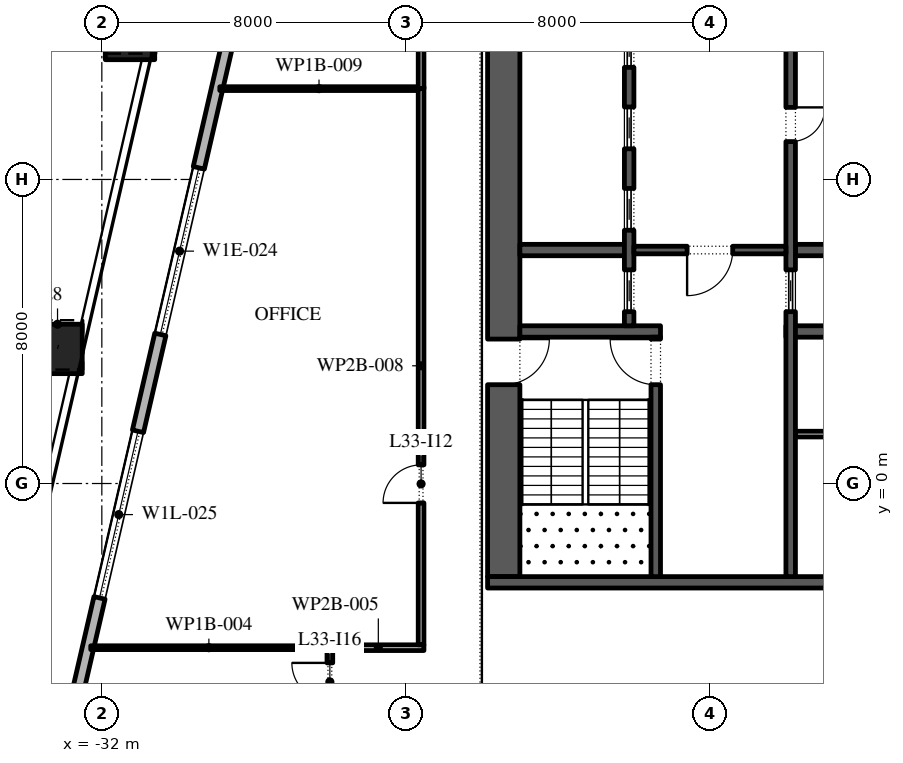
"""IFC4 building model, lengths in metres.
Left out: names, types, materials, properties, quantities, classifications, styles, units other than length and angle.
Written with IfcOpenShell. Run it as: python <this file> out.ifc"""

import sys

from ifc_helpers import new_model, si_unit, direction, frame, frame_2d, origin, origin_2d, place, context, subcontext, project, spatial, rectangle, extrude, element, fill, save


model = new_model("IFC4")
c1 = context("Model", 3, precision=1e-05, world=origin(), true_north=direction((0.0, 1.0)))
c2 = subcontext(c1, "Body", "Model", "MODEL_VIEW")
j1 = project(units=[si_unit("LENGTHUNIT", "METRE"), si_unit("PLANEANGLEUNIT", "RADIAN")], contexts=[c1])
p1 = place(None, origin())
s1 = spatial("IfcSite", under=j1, at=p1, CompositionType="ELEMENT")
p2 = place(p1, origin())
s2 = spatial("IfcBuilding", under=s1, at=p2, CompositionType="ELEMENT")
p3 = place(p2, frame((0.0, 0.0, 151.8)))
s3 = spatial("IfcBuildingStorey", under=s2, at=p3, CompositionType="ELEMENT", Elevation=151.8)
p4 = place(p3, frame((-31.259, 11.801, 0.0), z_axis=(0.008770884695, 0.037929719907, 0.99924191662), x_axis=(-0.974290512438, 0.225295355862, 0.0)))
e1 = element("IfcColumn", 1, at=p4, inside=s3, PredefinedType="COLUMN", context=c2, shape_type="SweptSolid", body=[
    extrude(rectangle(XDim=1.3, YDim=1.3, at=origin_2d()), origin(), (0.0, 0.0, 1.0), 4.203),
])
p5 = place(p3, frame((-33.166, 3.541, 0.0), z_axis=(0.005869091843, 0.025277771797, 0.999663237302), x_axis=(-0.974088391429, 0.226167649504, 0.0)))
e2 = element("IfcColumn", 2, at=p5, inside=s3, PredefinedType="COLUMN", context=c2, shape_type="SweptSolid", body=[
    extrude(rectangle(XDim=1.3, YDim=1.3, at=origin_2d()), origin(), (0.0, 0.0, 1.0), 4.201),
])
p6 = place(p3, frame((-22.82, 37.016, 0.0), z_axis=(0.0, 0.0, 1.0), x_axis=(-0.224953880882, -0.974369412223, 0.0)))
e3 = element("IfcWall", 3, at=p6, inside=s3, PredefinedType="STANDARD", context=c2, shape_type="SweptSolid", body=[
    extrude(rectangle(XDim=49.5, YDim=0.3, at=frame_2d((24.75, 0.0))), origin(), (0.0, 0.0, 1.0), 3.95),
])
p7 = place(p6, frame((1.157, 0.0, 0.45)))
e4 = element("IfcOpeningElement", 4, at=p7, cuts=e3, PredefinedType="OPENING", context=c2, shape_type="SweptSolid", body=[
    extrude(rectangle(XDim=4.5, YDim=3.05, at=frame_2d((2.25, 1.525))), frame((0.0, 0.16, 0.0), z_axis=(0.0, -1.0, 0.0), x_axis=(1.0, 0.0, 0.0)), (0.0, 0.0, 1.0), 0.32),
])
p8 = place(p6, frame((8.121, 0.0, 0.45)))
e5 = element("IfcOpeningElement", 5, at=p8, cuts=e3, PredefinedType="OPENING", context=c2, shape_type="SweptSolid", body=[
    extrude(rectangle(XDim=4.5, YDim=3.0, at=frame_2d((2.25, 1.5))), frame((0.0, 0.16, 0.0), z_axis=(0.0, -1.0, 0.0), x_axis=(1.0, 0.0, 0.0)), (0.0, 0.0, 1.0), 0.32),
])
p9 = place(p6, frame((15.236, 0.0, 0.45)))
e6 = element("IfcOpeningElement", 6, at=p9, cuts=e3, PredefinedType="OPENING", context=c2, shape_type="SweptSolid", body=[
    extrude(rectangle(XDim=4.5, YDim=3.0, at=frame_2d((2.25, 1.5))), frame((0.0, 0.16, 0.0), z_axis=(0.0, -1.0, 0.0), x_axis=(1.0, 0.0, 0.0)), (0.0, 0.0, 1.0), 0.32),
])
p10 = place(p6, frame((23.4, 0.0, 0.0)))
e7 = element("IfcOpeningElement", 7, at=p10, cuts=e3, PredefinedType="OPENING", context=c2, shape_type="SweptSolid", body=[
    extrude(rectangle(XDim=2.4, YDim=3.5, at=frame_2d((1.2, 1.75))), frame((0.0, 0.16, 0.0), z_axis=(0.0, -1.0, 0.0), x_axis=(1.0, 0.0, 0.0)), (0.0, 0.0, 1.0), 0.32),
])
p11 = place(p6, frame((29.464, 0.0, 0.45)))
e8 = element("IfcOpeningElement", 8, at=p11, cuts=e3, PredefinedType="OPENING", context=c2, shape_type="SweptSolid", body=[
    extrude(rectangle(XDim=4.5, YDim=2.825, at=frame_2d((2.25, 1.413))), frame((0.0, 0.16, 0.0), z_axis=(0.0, -1.0, 0.0), x_axis=(1.0, 0.0, 0.0)), (0.0, 0.0, 1.0), 0.32),
])
p12 = place(p6, frame((36.579, 0.0, 0.45)))
e9 = element("IfcOpeningElement", 9, at=p12, cuts=e3, PredefinedType="OPENING", context=c2, shape_type="SweptSolid", body=[
    extrude(rectangle(XDim=4.5, YDim=2.625, at=frame_2d((2.25, 1.312))), frame((0.0, 0.16, 0.0), z_axis=(0.0, -1.0, 0.0), x_axis=(1.0, 0.0, 0.0)), (0.0, 0.0, 1.0), 0.32),
])
p13 = place(p6, frame((43.693, 0.0, 0.45)))
e10 = element("IfcOpeningElement", 10, at=p13, cuts=e3, PredefinedType="OPENING", context=c2, shape_type="SweptSolid", body=[
    extrude(rectangle(XDim=4.5, YDim=3.05, at=frame_2d((2.25, 1.525))), frame((0.0, 0.16, 0.0), z_axis=(0.0, -1.0, 0.0), x_axis=(1.0, 0.0, 0.0)), (0.0, 0.0, 1.0), 0.32),
])
p14 = place(p3, frame((-21.425, -2.45, 0.0), z_axis=(0.0, 0.0, 1.0), x_axis=(0.0, 1.0, 0.0)))
e11 = element("IfcWall", 11, at=p14, inside=s3, PredefinedType="SHEAR", context=c2, shape_type="SweptSolid", body=[
    extrude(rectangle(XDim=27.9, YDim=0.85, at=frame_2d((13.95, 0.0))), origin(), (0.0, 0.0, 1.0), 3.95),
])
p15 = place(p14, frame((5.05, 0.0, 0.0)))
e12 = element("IfcOpeningElement", 12, at=p15, cuts=e11, PredefinedType="OPENING", context=c2, shape_type="SweptSolid", body=[
    extrude(rectangle(XDim=1.2, YDim=2.1, at=frame_2d((0.6, 1.05))), frame((0.0, 0.435, 0.0), z_axis=(0.0, -1.0, 0.0), x_axis=(1.0, 0.0, 0.0)), (0.0, 0.0, 1.0), 0.87),
])
p16 = place(p14, frame((21.65, 0.0, 0.0)))
e13 = element("IfcOpeningElement", 13, at=p16, cuts=e11, PredefinedType="OPENING", context=c2, shape_type="SweptSolid", body=[
    extrude(rectangle(XDim=1.2, YDim=2.1, at=frame_2d((0.6, 1.05))), frame((0.0, 0.435, 0.0), z_axis=(0.0, -1.0, 0.0), x_axis=(1.0, 0.0, 0.0)), (0.0, 0.0, 1.0), 0.87),
])
p17 = place(p3, frame((-21.85, -2.6, 0.0), z_axis=(0.0, 0.0, 1.0), x_axis=(1.0, 0.0, 0.0)))
e14 = element("IfcWall", 14, at=p17, inside=s3, PredefinedType="SHEAR", context=c2, shape_type="SweptSolid", body=[
    extrude(rectangle(XDim=11.7, YDim=0.3, at=frame_2d((5.85, 0.0))), origin(), (0.0, 0.0, 1.0), 3.95),
])
p18 = place(p3, frame((-21.0, 4.0, 0.0), z_axis=(0.0, 0.0, 1.0), x_axis=(1.0, 0.0, 0.0)))
e15 = element("IfcWall", 15, at=p18, inside=s3, PredefinedType="SHEAR", context=c2, shape_type="SweptSolid", body=[
    extrude(rectangle(XDim=3.7, YDim=0.3, at=frame_2d((1.85, 0.0))), origin(), (0.0, 0.0, 1.0), 3.95),
])
p19 = place(p3, frame((-17.425, -2.45, 0.0), z_axis=(0.0, 0.0, 1.0), x_axis=(0.0, 1.0, 0.0)))
e16 = element("IfcWall", 16, at=p19, inside=s3, PredefinedType="SHEAR", context=c2, shape_type="SweptSolid", body=[
    extrude(rectangle(XDim=6.3, YDim=0.25, at=frame_2d((3.15, 0.0))), origin(), (0.0, 0.0, 1.0), 3.95),
])
p20 = place(p19, frame((5.05, 0.0, 0.0)))
e17 = element("IfcOpeningElement", 17, at=p20, cuts=e16, PredefinedType="OPENING", context=c2, shape_type="SweptSolid", body=[
    extrude(rectangle(XDim=1.2, YDim=2.1, at=frame_2d((0.6, 1.05))), frame((0.0, 0.135, 0.0), z_axis=(0.0, -1.0, 0.0), x_axis=(1.0, 0.0, 0.0)), (0.0, 0.0, 1.0), 0.27),
])
p21 = place(p3, frame((-21.0, 6.143, 0.0), z_axis=(0.0, 0.0, 1.0), x_axis=(1.0, 0.0, 0.0)))
e18 = element("IfcWall", 18, at=p21, inside=s3, PredefinedType="SHEAR", context=c2, shape_type="SweptSolid", body=[
    extrude(rectangle(XDim=2.75, YDim=0.3, at=frame_2d((1.375, 0.0))), origin(), (0.0, 0.0, 1.0), 3.95),
])
p22 = place(p3, frame((-18.125, 4.15, 0.0), z_axis=(0.0, 0.0, 1.0), x_axis=(0.0, 1.0, 0.0)))
e19 = element("IfcWall", 19, at=p22, inside=s3, PredefinedType="SHEAR", context=c2, shape_type="SweptSolid", body=[
    extrude(rectangle(XDim=14.7, YDim=0.25, at=frame_2d((7.35, 0.0))), origin(), (0.0, 0.0, 1.0), 3.95),
])
p23 = place(p22, frame((0.371, 0.0, 0.0)))
e20 = element("IfcOpeningElement", 20, at=p23, cuts=e19, PredefinedType="OPENING", context=c2, shape_type="SweptSolid", body=[
    extrude(rectangle(XDim=1.1, YDim=2.1, at=frame_2d((0.55, 1.05))), frame((0.0, 0.135, 0.0), z_axis=(0.0, -1.0, 0.0), x_axis=(1.0, 0.0, 0.0)), (0.0, 0.0, 1.0), 0.27),
])
p24 = place(p22, frame((2.514, 0.0, 0.0)))
e21 = element("IfcOpeningElement", 21, at=p24, cuts=e19, PredefinedType="OPENING", context=c2, shape_type="SweptSolid", body=[
    extrude(rectangle(XDim=1.1, YDim=2.1, at=frame_2d((0.55, 1.05))), frame((0.0, 0.135, 0.0), z_axis=(0.0, -1.0, 0.0), x_axis=(1.0, 0.0, 0.0)), (0.0, 0.0, 1.0), 0.27),
])
p25 = place(p22, frame((4.657, 0.0, 0.0)))
e22 = element("IfcOpeningElement", 22, at=p25, cuts=e19, PredefinedType="OPENING", context=c2, shape_type="SweptSolid", body=[
    extrude(rectangle(XDim=1.1, YDim=2.1, at=frame_2d((0.55, 1.05))), frame((0.0, 0.135, 0.0), z_axis=(0.0, -1.0, 0.0), x_axis=(1.0, 0.0, 0.0)), (0.0, 0.0, 1.0), 0.27),
])
p26 = place(p22, frame((6.8, 0.0, 0.0)))
e23 = element("IfcOpeningElement", 23, at=p26, cuts=e19, PredefinedType="OPENING", context=c2, shape_type="SweptSolid", body=[
    extrude(rectangle(XDim=1.1, YDim=2.1, at=frame_2d((0.55, 1.05))), frame((0.0, 0.135, 0.0), z_axis=(0.0, -1.0, 0.0), x_axis=(1.0, 0.0, 0.0)), (0.0, 0.0, 1.0), 0.27),
])
p27 = place(p22, frame((8.943, 0.0, 0.0)))
e24 = element("IfcOpeningElement", 24, at=p27, cuts=e19, PredefinedType="OPENING", context=c2, shape_type="SweptSolid", body=[
    extrude(rectangle(XDim=1.1, YDim=2.1, at=frame_2d((0.55, 1.05))), frame((0.0, 0.135, 0.0), z_axis=(0.0, -1.0, 0.0), x_axis=(1.0, 0.0, 0.0)), (0.0, 0.0, 1.0), 0.27),
])
p28 = place(p22, frame((11.086, 0.0, 0.0)))
e25 = element("IfcOpeningElement", 25, at=p28, cuts=e19, PredefinedType="OPENING", context=c2, shape_type="SweptSolid", body=[
    extrude(rectangle(XDim=1.1, YDim=2.1, at=frame_2d((0.55, 1.05))), frame((0.0, 0.135, 0.0), z_axis=(0.0, -1.0, 0.0), x_axis=(1.0, 0.0, 0.0)), (0.0, 0.0, 1.0), 0.27),
])
p29 = place(p22, frame((13.229, 0.0, 0.0)))
e26 = element("IfcOpeningElement", 26, at=p29, cuts=e19, PredefinedType="OPENING", context=c2, shape_type="SweptSolid", body=[
    extrude(rectangle(XDim=1.1, YDim=2.1, at=frame_2d((0.55, 1.05))), frame((0.0, 0.135, 0.0), z_axis=(0.0, -1.0, 0.0), x_axis=(1.0, 0.0, 0.0)), (0.0, 0.0, 1.0), 0.27),
])
p30 = place(p3, frame((-14.0, 4.0, 0.0), z_axis=(0.0, 0.0, 1.0), x_axis=(1.0, 0.0, 0.0)))
e27 = element("IfcWall", 27, at=p30, inside=s3, PredefinedType="SHEAR", context=c2, shape_type="SweptSolid", body=[
    extrude(rectangle(XDim=3.0, YDim=0.3, at=frame_2d((1.5, 0.0))), origin(), (0.0, 0.0, 1.0), 3.95),
])
p31 = place(p3, frame((-13.75, 6.143, 0.0), z_axis=(0.0, 0.0, 1.0), x_axis=(1.0, 0.0, 0.0)))
e28 = element("IfcWall", 28, at=p31, inside=s3, PredefinedType="SHEAR", context=c2, shape_type="SweptSolid", body=[
    extrude(rectangle(XDim=2.75, YDim=0.3, at=frame_2d((1.375, 0.0))), origin(), (0.0, 0.0, 1.0), 3.95),
])
p32 = place(p3, frame((-13.875, -2.45, 0.0), z_axis=(0.0, 0.0, 1.0), x_axis=(0.0, 1.0, 0.0)))
e29 = element("IfcWall", 29, at=p32, inside=s3, PredefinedType="SHEAR", context=c2, shape_type="SweptSolid", body=[
    extrude(rectangle(XDim=21.3, YDim=0.25, at=frame_2d((10.65, 0.0))), origin(), (0.0, 0.0, 1.0), 3.95),
])
p33 = place(p32, frame((11.446, 0.0, 0.0)))
e30 = element("IfcOpeningElement", 30, at=p33, cuts=e29, PredefinedType="OPENING", context=c2, shape_type="SweptSolid", body=[
    extrude(rectangle(XDim=0.9, YDim=2.1, at=frame_2d((0.45, 1.05))), frame((0.0, 0.135, 0.0), z_axis=(0.0, -1.0, 0.0), x_axis=(1.0, 0.0, 0.0)), (0.0, 0.0, 1.0), 0.27),
])
p34 = place(p32, frame((17.725, 0.0, 0.0)))
e31 = element("IfcOpeningElement", 31, at=p34, cuts=e29, PredefinedType="OPENING", context=c2, shape_type="SweptSolid", body=[
    extrude(rectangle(XDim=0.9, YDim=2.1, at=frame_2d((0.45, 1.05))), frame((0.0, 0.135, 0.0), z_axis=(0.0, -1.0, 0.0), x_axis=(1.0, 0.0, 0.0)), (0.0, 0.0, 1.0), 0.27),
])
p35 = place(p32, frame((6.971, 0.0, 0.0)))
e32 = element("IfcOpeningElement", 32, at=p35, cuts=e29, PredefinedType="OPENING", context=c2, shape_type="SweptSolid", body=[
    extrude(rectangle(XDim=1.1, YDim=2.1, at=frame_2d((0.55, 1.05))), frame((0.0, 0.135, 0.0), z_axis=(0.0, -1.0, 0.0), x_axis=(1.0, 0.0, 0.0)), (0.0, 0.0, 1.0), 0.27),
])
p36 = place(p3, frame((-18.0, 6.143, 0.0), z_axis=(0.0, 0.0, 1.0), x_axis=(1.0, 0.0, 0.0)))
e33 = element("IfcWall", 33, at=p36, inside=s3, PredefinedType="SHEAR", context=c2, shape_type="SweptSolid", body=[
    extrude(rectangle(XDim=4.0, YDim=0.2, at=frame_2d((2.0, 0.0))), origin(), (0.0, 0.0, 1.0), 3.95),
])
p37 = place(p36, frame((1.4, 0.0, 0.0)))
e34 = element("IfcOpeningElement", 34, at=p37, cuts=e33, PredefinedType="OPENING", context=c2, shape_type="SweptSolid", body=[
    extrude(rectangle(XDim=1.2, YDim=2.1, at=frame_2d((0.6, 1.05))), frame((0.0, 0.11, 0.0), z_axis=(0.0, -1.0, 0.0), x_axis=(1.0, 0.0, 0.0)), (0.0, 0.0, 1.0), 0.22),
])
p38 = place(p3, frame((-13.75, 1.3, 0.0), z_axis=(0.0, 0.0, 1.0), x_axis=(1.0, 0.0, 0.0)))
e35 = element("IfcWall", 35, at=p38, inside=s3, PredefinedType="PARTITIONING", context=c2, shape_type="SweptSolid", body=[
    extrude(rectangle(XDim=2.75, YDim=0.15, at=frame_2d((1.375, 0.0))), origin(), (0.0, 0.0, 1.0), 3.95),
])
p39 = place(p3, frame((-26.0, -7.365, 0.0), z_axis=(0.0, 0.0, 1.0), x_axis=(0.0, 1.0, 0.0)))
e36 = element("IfcWall", 36, at=p39, inside=s3, PredefinedType="PARTITIONING", context=c2, shape_type="SweptSolid", body=[
    extrude(rectangle(XDim=3.095, YDim=0.15, at=frame_2d((1.547, 0.0))), origin(), (0.0, 0.0, 1.0), 3.114),
])
p40 = place(p39, frame((1.645, 0.0, 0.0)))
e37 = element("IfcOpeningElement", 37, at=p40, cuts=e36, PredefinedType="OPENING", context=c2, shape_type="SweptSolid", body=[
    extrude(rectangle(XDim=1.0, YDim=2.1, at=frame_2d((0.5, 1.05))), frame((0.0, 0.085, 0.0), z_axis=(0.0, -1.0, 0.0), x_axis=(1.0, 0.0, 0.0)), (0.0, 0.0, 1.0), 0.17),
])
p41 = place(p3, frame((-26.075, -4.32, 0.0), z_axis=(0.0, 0.0, 1.0), x_axis=(-1.0, 0.0, 0.0)))
e38 = element("IfcWall", 38, at=p41, inside=s3, PredefinedType="PARTITIONING", context=c2, shape_type="SweptSolid", body=[
    extrude(rectangle(XDim=6.217, YDim=0.1, at=frame_2d((3.108, 0.0))), origin(), (0.0, 0.0, 1.0), 3.95),
])
p42 = place(p3, frame((-25.925, -4.32, 0.0), z_axis=(0.0, 0.0, 1.0), x_axis=(1.0, 0.0, 0.0)))
e39 = element("IfcWall", 39, at=p42, inside=s3, PredefinedType="PARTITIONING", context=c2, shape_type="SweptSolid", body=[
    extrude(rectangle(XDim=2.4, YDim=0.15, at=frame_2d((1.2, 0.0))), origin(), (0.0, 0.0, 1.0), 3.95),
])
p43 = place(p3, frame((-23.6, -4.245, 0.0), z_axis=(0.0, 0.0, 1.0), x_axis=(0.0, 1.0, 0.0)))
e40 = element("IfcWall", 40, at=p43, inside=s3, PredefinedType="PARTITIONING", context=c2, shape_type="SweptSolid", body=[
    extrude(rectangle(XDim=14.685, YDim=0.15, at=frame_2d((7.343, 0.0))), origin(), (0.0, 0.0, 1.0), 3.95),
])
p44 = place(p43, frame((3.735, 0.0, 0.0)))
e41 = element("IfcOpeningElement", 41, at=p44, cuts=e40, PredefinedType="OPENING", context=c2, shape_type="SweptSolid", body=[
    extrude(rectangle(XDim=1.0, YDim=2.1, at=frame_2d((0.5, 1.05))), frame((0.0, 0.085, 0.0), z_axis=(0.0, -1.0, 0.0), x_axis=(1.0, 0.0, 0.0)), (0.0, 0.0, 1.0), 0.17),
])
p45 = place(p3, frame((-23.675, 10.39, 0.0), z_axis=(0.0, 0.0, 1.0), x_axis=(-1.0, 0.0, 0.0)))
e42 = element("IfcWall", 42, at=p45, inside=s3, PredefinedType="PARTITIONING", context=c2, shape_type="SweptSolid", body=[
    extrude(rectangle(XDim=5.221, YDim=0.1, at=frame_2d((2.61, 0.0))), origin(), (0.0, 0.0, 1.0), 3.95),
])
p46 = place(p3, frame((-23.6, 10.39, 0.0), z_axis=(0.0, 0.0, 1.0), x_axis=(0.0, 1.0, 0.0)))
e43 = element("IfcWall", 43, at=p46, inside=s3, PredefinedType="PARTITIONING", context=c2, shape_type="SweptSolid", body=[
    extrude(rectangle(XDim=13.095, YDim=0.15, at=frame_2d((6.548, 0.0))), origin(), (0.0, 0.0, 1.0), 3.95),
])
p47 = place(p46, frame((8.62, 0.0, 0.0)))
e44 = element("IfcOpeningElement", 44, at=p47, cuts=e43, PredefinedType="OPENING", context=c2, shape_type="SweptSolid", body=[
    extrude(rectangle(XDim=1.0, YDim=2.1, at=frame_2d((0.5, 1.05))), frame((0.0, 0.085, 0.0), z_axis=(0.0, -1.0, 0.0), x_axis=(1.0, 0.0, 0.0)), (0.0, 0.0, 1.0), 0.17),
])
p48 = place(p11, origin())
e45 = element("IfcWindow", 45, at=p48, inside=s3, PartitioningType="DOUBLE_PANEL_VERTICAL", PredefinedType="WINDOW", context=c2, shape_type="SweptSolid", body=[
    extrude(rectangle(XDim=4.5, YDim=2.825, at=frame_2d((2.25, 1.413))), frame((0.0, 0.03, 0.0), z_axis=(0.0, -1.0, 0.0), x_axis=(1.0, 0.0, 0.0)), (0.0, 0.0, 1.0), 0.06),
])
fill(e8, e45)
p49 = place(p12, origin())
e46 = element("IfcWindow", 46, at=p49, inside=s3, PartitioningType="DOUBLE_PANEL_VERTICAL", PredefinedType="WINDOW", context=c2, shape_type="SweptSolid", body=[
    extrude(rectangle(XDim=4.5, YDim=2.625, at=frame_2d((2.25, 1.312))), frame((0.0, 0.03, 0.0), z_axis=(0.0, -1.0, 0.0), x_axis=(1.0, 0.0, 0.0)), (0.0, 0.0, 1.0), 0.06),
])
fill(e9, e46)
p50 = place(p23, origin())
e47 = element("IfcDoor", 47, at=p50, inside=s3, OperationType="SLIDING_TO_LEFT", PredefinedType="DOOR", context=c2, shape_type="SweptSolid", body=[
    extrude(rectangle(XDim=1.1, YDim=2.1, at=frame_2d((0.55, 1.05))), frame((0.0, 0.025, 0.0), z_axis=(0.0, -1.0, 0.0), x_axis=(1.0, 0.0, 0.0)), (0.0, 0.0, 1.0), 0.05),
])
fill(e20, e47)
p51 = place(p24, origin())
e48 = element("IfcDoor", 48, at=p51, inside=s3, OperationType="SLIDING_TO_LEFT", PredefinedType="DOOR", context=c2, shape_type="SweptSolid", body=[
    extrude(rectangle(XDim=1.1, YDim=2.1, at=frame_2d((0.55, 1.05))), frame((0.0, 0.025, 0.0), z_axis=(0.0, -1.0, 0.0), x_axis=(1.0, 0.0, 0.0)), (0.0, 0.0, 1.0), 0.05),
])
fill(e21, e48)
p52 = place(p25, origin())
e49 = element("IfcDoor", 49, at=p52, inside=s3, OperationType="SLIDING_TO_LEFT", PredefinedType="DOOR", context=c2, shape_type="SweptSolid", body=[
    extrude(rectangle(XDim=1.1, YDim=2.1, at=frame_2d((0.55, 1.05))), frame((0.0, 0.025, 0.0), z_axis=(0.0, -1.0, 0.0), x_axis=(1.0, 0.0, 0.0)), (0.0, 0.0, 1.0), 0.05),
])
fill(e22, e49)
p53 = place(p26, origin())
e50 = element("IfcDoor", 50, at=p53, inside=s3, OperationType="SLIDING_TO_LEFT", PredefinedType="DOOR", context=c2, shape_type="SweptSolid", body=[
    extrude(rectangle(XDim=1.1, YDim=2.1, at=frame_2d((0.55, 1.05))), frame((0.0, 0.025, 0.0), z_axis=(0.0, -1.0, 0.0), x_axis=(1.0, 0.0, 0.0)), (0.0, 0.0, 1.0), 0.05),
])
fill(e23, e50)
p54 = place(p33, frame((0.9, -0.2, 0.0), z_axis=(0.0, 0.0, 1.0), x_axis=(-1.0, 0.0, 0.0)))
e51 = element("IfcDoor", 51, at=p54, inside=s3, OperationType="SINGLE_SWING_RIGHT", PredefinedType="DOOR", context=c2, shape_type="SweptSolid", body=[
    extrude(rectangle(XDim=0.9, YDim=2.1, at=frame_2d((0.45, 1.05))), frame((0.0, -0.075, 0.0), z_axis=(0.0, -1.0, 0.0), x_axis=(1.0, 0.0, 0.0)), (0.0, 0.0, 1.0), 0.05),
])
fill(e30, e51)
p55 = place(p35, origin())
e52 = element("IfcDoor", 52, at=p55, inside=s3, OperationType="SLIDING_TO_LEFT", PredefinedType="DOOR", context=c2, shape_type="SweptSolid", body=[
    extrude(rectangle(XDim=1.1, YDim=2.1, at=frame_2d((0.55, 1.05))), frame((0.0, 0.025, 0.0), z_axis=(0.0, -1.0, 0.0), x_axis=(1.0, 0.0, 0.0)), (0.0, 0.0, 1.0), 0.05),
])
fill(e32, e52)
p56 = place(p37, frame((1.2, 0.0, 0.0), z_axis=(0.0, 0.0, 1.0), x_axis=(-1.0, 0.0, 0.0)))
e53 = element("IfcDoor", 53, at=p56, inside=s3, OperationType="SINGLE_SWING_LEFT", PredefinedType="DOOR", context=c2, shape_type="SweptSolid", body=[
    extrude(rectangle(XDim=1.2, YDim=2.1, at=frame_2d((0.6, 1.05))), frame((0.0, 0.025, 0.0), z_axis=(0.0, -1.0, 0.0), x_axis=(1.0, 0.0, 0.0)), (0.0, 0.0, 1.0), 0.05),
])
fill(e34, e53)
p57 = place(p20, origin())
e54 = element("IfcDoor", 54, at=p57, inside=s3, OperationType="SINGLE_SWING_LEFT", PredefinedType="DOOR", context=c2, shape_type="SweptSolid", body=[
    extrude(rectangle(XDim=1.2, YDim=2.1, at=frame_2d((0.6, 1.05))), frame((0.0, 0.025, 0.0), z_axis=(0.0, -1.0, 0.0), x_axis=(1.0, 0.0, 0.0)), (0.0, 0.0, 1.0), 0.05),
])
fill(e17, e54)
p58 = place(p15, frame((1.2, 0.0, 0.0), z_axis=(0.0, 0.0, 1.0), x_axis=(-1.0, 0.0, 0.0)))
e55 = element("IfcDoor", 55, at=p58, inside=s3, OperationType="SINGLE_SWING_RIGHT", PredefinedType="DOOR", context=c2, shape_type="SweptSolid", body=[
    extrude(rectangle(XDim=1.2, YDim=2.1, at=frame_2d((0.6, 1.05))), frame((0.0, 0.025, 0.0), z_axis=(0.0, -1.0, 0.0), x_axis=(1.0, 0.0, 0.0)), (0.0, 0.0, 1.0), 0.05),
])
fill(e12, e55)
p59 = place(p44, origin())
e56 = element("IfcDoor", 56, at=p59, inside=s3, OperationType="SINGLE_SWING_RIGHT", PredefinedType="DOOR", context=c2, shape_type="SweptSolid", body=[
    extrude(rectangle(XDim=1.0, YDim=2.1, at=frame_2d((0.5, 1.05))), frame((0.0, 0.025, 0.0), z_axis=(0.0, -1.0, 0.0), x_axis=(1.0, 0.0, 0.0)), (0.0, 0.0, 1.0), 0.05),
])
fill(e41, e56)
p60 = place(p40, origin())
e57 = element("IfcDoor", 57, at=p60, inside=s3, OperationType="SINGLE_SWING_LEFT", PredefinedType="DOOR", context=c2, shape_type="SweptSolid", body=[
    extrude(rectangle(XDim=1.0, YDim=2.1, at=frame_2d((0.5, 1.05))), frame((0.0, 0.025, 0.0), z_axis=(0.0, -1.0, 0.0), x_axis=(1.0, 0.0, 0.0)), (0.0, 0.0, 1.0), 0.05),
])
fill(e37, e57)
save(model, sys.argv[1])
